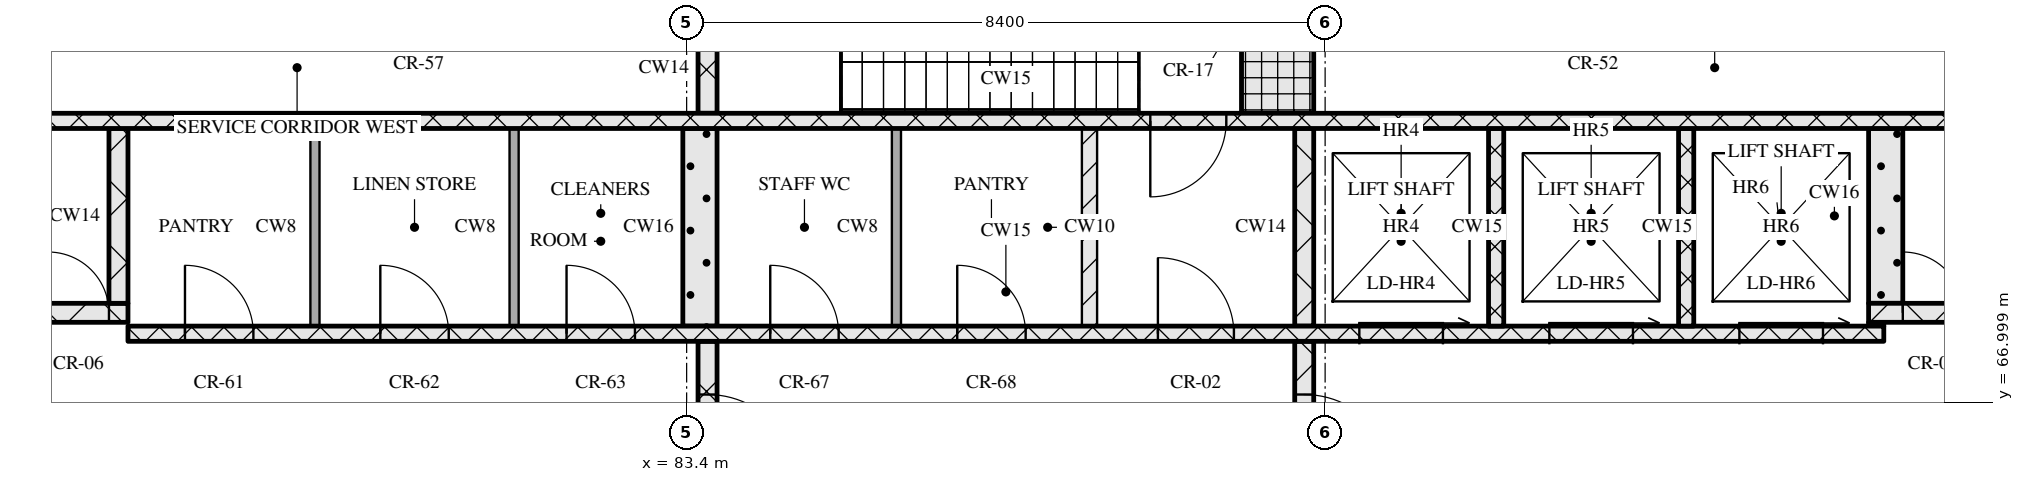
"""IFC4 building model, lengths in metres.
Left out: names, types, materials, properties, quantities, classifications, styles, units other than length and angle.
Written with IfcOpenShell. Run it as: python <this file> out.ifc"""

import sys

from ifc_helpers import new_model, si_unit, direction, frame, frame_2d, origin, place, context, subcontext, project, spatial, rectangle, extrude, element, fill, save


model = new_model("IFC4")
c1 = context("Model", 3, precision=1e-05, world=origin(), true_north=direction((0.0, 1.0)))
c2 = subcontext(c1, "Body", "Model", "MODEL_VIEW")
j1 = project(units=[si_unit("LENGTHUNIT", "METRE"), si_unit("PLANEANGLEUNIT", "RADIAN")], contexts=[c1])
p1 = place(None, origin())
s1 = spatial("IfcSite", under=j1, at=p1, CompositionType="ELEMENT")
p2 = place(p1, origin())
s2 = spatial("IfcBuilding", under=s1, at=p2, CompositionType="ELEMENT")
p3 = place(p2, frame((0.0, 0.0, 194.25)))
s3 = spatial("IfcBuildingStorey", under=s2, at=p3, CompositionType="ELEMENT", Elevation=194.25)
p4 = place(p3, frame((83.675, 65.2, 0.0), z_axis=(0.0, 0.0, 1.0), x_axis=(0.0, 1.0, 0.0)))
e1 = element("IfcWall", 1, at=p4, inside=s3, PredefinedType="SOLIDWALL", context=c2, shape_type="SweptSolid", body=[
    extrude(rectangle(XDim=2.6, YDim=0.25, at=frame_2d((1.3, 0.0))), origin(), (0.0, 0.0, 1.0), 10.97),
])
p5 = place(p4, frame((0.7, 0.0, 0.0)))
e2 = element("IfcOpeningElement", 2, at=p5, cuts=e1, PredefinedType="OPENING", context=c2, shape_type="SweptSolid", body=[
    extrude(rectangle(XDim=1.2, YDim=2.1, at=frame_2d((0.6, 1.05))), frame((0.0, 0.135, 0.0), z_axis=(0.0, -1.0, 0.0), x_axis=(1.0, 0.0, 0.0)), (0.0, 0.0, 1.0), 0.27),
])
p6 = place(p3, frame((91.525, 65.2, 0.0), z_axis=(0.0, 0.0, 1.0), x_axis=(0.0, 1.0, 0.0)))
e3 = element("IfcWall", 3, at=p6, inside=s3, PredefinedType="SOLIDWALL", context=c2, shape_type="SweptSolid", body=[
    extrude(rectangle(XDim=2.6, YDim=0.25, at=frame_2d((1.3, 0.0))), origin(), (0.0, 0.0, 1.0), 10.97),
])
p7 = place(p6, frame((0.7, 0.0, 0.0)))
e4 = element("IfcOpeningElement", 4, at=p7, cuts=e3, PredefinedType="OPENING", context=c2, shape_type="SweptSolid", body=[
    extrude(rectangle(XDim=1.2, YDim=2.1, at=frame_2d((0.6, 1.05))), frame((0.0, 0.135, 0.0), z_axis=(0.0, -1.0, 0.0), x_axis=(1.0, 0.0, 0.0)), (0.0, 0.0, 1.0), 0.27),
])
p8 = place(p3, frame((76.05, 67.9, 0.0), z_axis=(0.0, 0.0, 1.0), x_axis=(1.0, 0.0, 0.0)))
e5 = element("IfcWall", 5, at=p8, inside=s3, PredefinedType="SOLIDWALL", context=c2, shape_type="SweptSolid", body=[
    extrude(rectangle(XDim=23.1, YDim=0.2, at=frame_2d((11.55, 0.0))), origin(), (0.0, 0.0, 1.0), 10.97),
])
p9 = place(p8, frame((0.75, 0.0, 0.0)))
e6 = element("IfcOpeningElement", 6, at=p9, cuts=e5, PredefinedType="OPENING", context=c2, shape_type="SweptSolid", body=[
    extrude(rectangle(XDim=0.9, YDim=2.1, at=frame_2d((0.45, 1.05))), frame((0.0, 0.11, 0.0), z_axis=(0.0, -1.0, 0.0), x_axis=(1.0, 0.0, 0.0)), (0.0, 0.0, 1.0), 0.22),
])
p10 = place(p8, frame((3.32, 0.0, 0.0)))
e7 = element("IfcOpeningElement", 7, at=p10, cuts=e5, PredefinedType="OPENING", context=c2, shape_type="SweptSolid", body=[
    extrude(rectangle(XDim=0.9, YDim=2.1, at=frame_2d((0.45, 1.05))), frame((0.0, 0.11, 0.0), z_axis=(0.0, -1.0, 0.0), x_axis=(1.0, 0.0, 0.0)), (0.0, 0.0, 1.0), 0.22),
])
p11 = place(p8, frame((5.77, 0.0, 0.0)))
e8 = element("IfcOpeningElement", 8, at=p11, cuts=e5, PredefinedType="OPENING", context=c2, shape_type="SweptSolid", body=[
    extrude(rectangle(XDim=0.9, YDim=2.1, at=frame_2d((0.45, 1.05))), frame((0.0, 0.11, 0.0), z_axis=(0.0, -1.0, 0.0), x_axis=(1.0, 0.0, 0.0)), (0.0, 0.0, 1.0), 0.22),
])
p12 = place(p8, frame((8.45, 0.0, 0.0)))
e9 = element("IfcOpeningElement", 9, at=p12, cuts=e5, PredefinedType="OPENING", context=c2, shape_type="SweptSolid", body=[
    extrude(rectangle(XDim=0.9, YDim=2.1, at=frame_2d((0.45, 1.05))), frame((0.0, 0.11, 0.0), z_axis=(0.0, -1.0, 0.0), x_axis=(1.0, 0.0, 0.0)), (0.0, 0.0, 1.0), 0.22),
])
p13 = place(p8, frame((10.91, 0.0, 0.0)))
e10 = element("IfcOpeningElement", 10, at=p13, cuts=e5, PredefinedType="OPENING", context=c2, shape_type="SweptSolid", body=[
    extrude(rectangle(XDim=0.9, YDim=2.1, at=frame_2d((0.45, 1.05))), frame((0.0, 0.11, 0.0), z_axis=(0.0, -1.0, 0.0), x_axis=(1.0, 0.0, 0.0)), (0.0, 0.0, 1.0), 0.22),
])
p14 = place(p8, frame((13.55, 0.0, 0.0)))
e11 = element("IfcOpeningElement", 11, at=p14, cuts=e5, PredefinedType="OPENING", context=c2, shape_type="SweptSolid", body=[
    extrude(rectangle(XDim=1.0, YDim=2.1, at=frame_2d((0.5, 1.05))), frame((0.0, 0.11, 0.0), z_axis=(0.0, -1.0, 0.0), x_axis=(1.0, 0.0, 0.0)), (0.0, 0.0, 1.0), 0.22),
])
p15 = place(p8, frame((16.2, 0.0, 0.0)))
e12 = element("IfcOpeningElement", 12, at=p15, cuts=e5, PredefinedType="OPENING", context=c2, shape_type="SweptSolid", body=[
    extrude(rectangle(XDim=1.1, YDim=2.1, at=frame_2d((0.55, 1.05))), frame((0.0, 0.11, 0.0), z_axis=(0.0, -1.0, 0.0), x_axis=(1.0, 0.0, 0.0)), (0.0, 0.0, 1.0), 0.22),
])
p16 = place(p8, frame((18.7, 0.0, 0.0)))
e13 = element("IfcOpeningElement", 13, at=p16, cuts=e5, PredefinedType="OPENING", context=c2, shape_type="SweptSolid", body=[
    extrude(rectangle(XDim=1.1, YDim=2.1, at=frame_2d((0.55, 1.05))), frame((0.0, 0.11, 0.0), z_axis=(0.0, -1.0, 0.0), x_axis=(1.0, 0.0, 0.0)), (0.0, 0.0, 1.0), 0.22),
])
p17 = place(p8, frame((21.2, 0.0, 0.0)))
e14 = element("IfcOpeningElement", 14, at=p17, cuts=e5, PredefinedType="OPENING", context=c2, shape_type="SweptSolid", body=[
    extrude(rectangle(XDim=1.1, YDim=2.1, at=frame_2d((0.55, 1.05))), frame((0.0, 0.11, 0.0), z_axis=(0.0, -1.0, 0.0), x_axis=(1.0, 0.0, 0.0)), (0.0, 0.0, 1.0), 0.22),
])
for number, where, z_axis, x_axis in (
    (15, (78.51, 68.0, 0.0), (0.0, 0.0, 1.0), (0.0, 1.0, 0.0)),
    (16, (81.13, 68.0, 0.0), (0.0, 0.0, 1.0), (0.0, 1.0, 0.0)),
):
    element("IfcWall", number, at=place(p3, frame(where, z_axis=z_axis, x_axis=x_axis)), inside=s3, PredefinedType="PARTITIONING", context=c2, shape_type="SweptSolid", body=[
        extrude(rectangle(XDim=2.6, YDim=0.12, at=frame_2d((1.3, 0.0))), origin(), (0.0, 0.0, 1.0), 10.97),
    ])
p18 = place(p3, frame((83.575, 68.0, 0.0), z_axis=(0.0, 0.0, 1.0), x_axis=(0.0, 1.0, 0.0)))
e17 = element("IfcWall", 17, at=p18, inside=s3, PredefinedType="SOLIDWALL", context=c2, shape_type="SweptSolid", body=[
    extrude(rectangle(XDim=2.6, YDim=0.45, at=frame_2d((1.3, 0.0))), origin(), (0.0, 0.0, 1.0), 10.97),
])
p19 = place(p3, frame((86.16, 68.0, 0.0), z_axis=(0.0, 0.0, 1.0), x_axis=(0.0, 1.0, 0.0)))
e18 = element("IfcWall", 18, at=p19, inside=s3, PredefinedType="PARTITIONING", context=c2, shape_type="SweptSolid", body=[
    extrude(rectangle(XDim=2.6, YDim=0.12, at=frame_2d((1.3, 0.0))), origin(), (0.0, 0.0, 1.0), 10.97),
])
p20 = place(p3, frame((88.7, 68.0, 0.0), z_axis=(0.0, 0.0, 1.0), x_axis=(0.0, 1.0, 0.0)))
e19 = element("IfcWall", 19, at=p20, inside=s3, PredefinedType="PARTITIONING", context=c2, shape_type="SweptSolid", body=[
    extrude(rectangle(XDim=2.6, YDim=0.2, at=frame_2d((1.3, 0.0))), origin(), (0.0, 0.0, 1.0), 10.97),
])
p21 = place(p3, frame((91.525, 68.0, 0.0), z_axis=(0.0, 0.0, 1.0), x_axis=(0.0, 1.0, 0.0)))
e20 = element("IfcWall", 20, at=p21, inside=s3, PredefinedType="SOLIDWALL", context=c2, shape_type="SweptSolid", body=[
    extrude(rectangle(XDim=2.6, YDim=0.25, at=frame_2d((1.3, 0.0))), origin(), (0.0, 0.0, 1.0), 10.97),
])
for number, where, z_axis, x_axis in (
    (21, (94.05, 68.0, 0.0), (0.0, 0.0, 1.0), (0.0, 1.0, 0.0)),
    (22, (96.55, 68.0, 0.0), (0.0, 0.0, 1.0), (0.0, 1.0, 0.0)),
):
    element("IfcWall", number, at=place(p3, frame(where, z_axis=z_axis, x_axis=x_axis)), inside=s3, PredefinedType="SOLIDWALL", context=c2, shape_type="SweptSolid", body=[
        extrude(rectangle(XDim=2.6, YDim=0.2, at=frame_2d((1.3, 0.0))), origin(), (0.0, 0.0, 1.0), 10.97),
    ])
p22 = place(p3, frame((98.95, 68.025, 0.0), z_axis=(0.0, 0.0, 1.0), x_axis=(1.0, 0.0, 0.0)))
e23 = element("IfcWall", 23, at=p22, inside=s3, PredefinedType="SOLIDWALL", context=c2, shape_type="SweptSolid", body=[
    extrude(rectangle(XDim=0.2, YDim=0.05, at=frame_2d((0.1, 0.0))), origin(), (0.0, 0.0, 1.0), 10.97),
])
p23 = place(p3, frame((67.8, 68.175, 0.0), z_axis=(0.0, 0.0, 1.0), x_axis=(1.0, 0.0, 0.0)))
e24 = element("IfcWall", 24, at=p23, inside=s3, PredefinedType="SOLIDWALL", context=c2, shape_type="SweptSolid", body=[
    extrude(rectangle(XDim=8.25, YDim=0.25, at=frame_2d((4.125, 0.0))), origin(), (0.0, 0.0, 1.0), 10.97),
])
p24 = place(p23, frame((5.7, 0.0, 0.0)))
e25 = element("IfcOpeningElement", 25, at=p24, cuts=e24, PredefinedType="OPENING", context=c2, shape_type="SweptSolid", body=[
    extrude(rectangle(XDim=1.0, YDim=2.1, at=frame_2d((0.5, 1.05))), frame((0.0, 0.135, 0.0), z_axis=(0.0, -1.0, 0.0), x_axis=(1.0, 0.0, 0.0)), (0.0, 0.0, 1.0), 0.27),
])
p25 = place(p23, frame((7.2, 0.0, 0.0)))
e26 = element("IfcOpeningElement", 26, at=p25, cuts=e24, PredefinedType="OPENING", context=c2, shape_type="SweptSolid", body=[
    extrude(rectangle(XDim=0.8, YDim=2.1, at=frame_2d((0.4, 1.05))), frame((0.0, 0.135, 0.0), z_axis=(0.0, -1.0, 0.0), x_axis=(1.0, 0.0, 0.0)), (0.0, 0.0, 1.0), 0.27),
])
p26 = place(p3, frame((98.95, 68.175, 0.0), z_axis=(0.0, 0.0, 1.0), x_axis=(1.0, 0.0, 0.0)))
e27 = element("IfcWall", 27, at=p26, inside=s3, PredefinedType="SOLIDWALL", context=c2, shape_type="SweptSolid", body=[
    extrude(rectangle(XDim=8.45, YDim=0.25, at=frame_2d((4.225, 0.0))), origin(), (0.0, 0.0, 1.0), 10.97),
])
p27 = place(p26, frame((0.45, 0.0, 0.0)))
e28 = element("IfcOpeningElement", 28, at=p27, cuts=e27, PredefinedType="OPENING", context=c2, shape_type="SweptSolid", body=[
    extrude(rectangle(XDim=0.8, YDim=2.1, at=frame_2d((0.4, 1.05))), frame((0.0, 0.135, 0.0), z_axis=(0.0, -1.0, 0.0), x_axis=(1.0, 0.0, 0.0)), (0.0, 0.0, 1.0), 0.27),
])
p28 = place(p26, frame((1.75, 0.0, 0.0)))
e29 = element("IfcOpeningElement", 29, at=p28, cuts=e27, PredefinedType="OPENING", context=c2, shape_type="SweptSolid", body=[
    extrude(rectangle(XDim=1.0, YDim=2.1, at=frame_2d((0.5, 1.05))), frame((0.0, 0.135, 0.0), z_axis=(0.0, -1.0, 0.0), x_axis=(1.0, 0.0, 0.0)), (0.0, 0.0, 1.0), 0.27),
])
p29 = place(p3, frame((75.925, 68.3, 0.0), z_axis=(0.0, 0.0, 1.0), x_axis=(0.0, 1.0, 0.0)))
e30 = element("IfcWall", 30, at=p29, inside=s3, PredefinedType="SOLIDWALL", context=c2, shape_type="SweptSolid", body=[
    extrude(rectangle(XDim=2.3, YDim=0.25, at=frame_2d((1.15, 0.0))), origin(), (0.0, 0.0, 1.0), 10.97),
])
p30 = place(p3, frame((99.175, 68.3, 0.0), z_axis=(0.0, 0.0, 1.0), x_axis=(0.0, 1.0, 0.0)))
e31 = element("IfcWall", 31, at=p30, inside=s3, PredefinedType="SOLIDWALL", context=c2, shape_type="SweptSolid", body=[
    extrude(rectangle(XDim=2.3, YDim=0.45, at=frame_2d((1.15, 0.0))), origin(), (0.0, 0.0, 1.0), 10.97),
])
p31 = place(p3, frame((67.8, 70.7, 0.0), z_axis=(0.0, 0.0, 1.0), x_axis=(1.0, 0.0, 0.0)))
e32 = element("IfcWall", 32, at=p31, inside=s3, PredefinedType="SOLIDWALL", context=c2, shape_type="SweptSolid", body=[
    extrude(rectangle(XDim=39.6, YDim=0.2, at=frame_2d((19.8, 0.0))), origin(), (0.0, 0.0, 1.0), 10.97),
])
p32 = place(p31, frame((0.65, 0.0, 0.0)))
e33 = element("IfcOpeningElement", 33, at=p32, cuts=e32, PredefinedType="OPENING", context=c2, shape_type="SweptSolid", body=[
    extrude(rectangle(XDim=1.1, YDim=2.1, at=frame_2d((0.55, 1.05))), frame((0.0, 0.11, 0.0), z_axis=(0.0, -1.0, 0.0), x_axis=(1.0, 0.0, 0.0)), (0.0, 0.0, 1.0), 0.22),
])
p33 = place(p31, frame((3.25, 0.0, 0.0)))
e34 = element("IfcOpeningElement", 34, at=p33, cuts=e32, PredefinedType="OPENING", context=c2, shape_type="SweptSolid", body=[
    extrude(rectangle(XDim=1.1, YDim=2.1, at=frame_2d((0.55, 1.05))), frame((0.0, 0.11, 0.0), z_axis=(0.0, -1.0, 0.0), x_axis=(1.0, 0.0, 0.0)), (0.0, 0.0, 1.0), 0.22),
])
p34 = place(p31, frame((5.9, 0.0, 0.0)))
e35 = element("IfcOpeningElement", 35, at=p34, cuts=e32, PredefinedType="OPENING", context=c2, shape_type="SweptSolid", body=[
    extrude(rectangle(XDim=1.0, YDim=2.1, at=frame_2d((0.5, 1.05))), frame((0.0, 0.11, 0.0), z_axis=(0.0, -1.0, 0.0), x_axis=(1.0, 0.0, 0.0)), (0.0, 0.0, 1.0), 0.22),
])
p35 = place(p31, frame((21.7, 0.0, 0.0)))
e36 = element("IfcOpeningElement", 36, at=p35, cuts=e32, PredefinedType="OPENING", context=c2, shape_type="SweptSolid", body=[
    extrude(rectangle(XDim=1.0, YDim=2.1, at=frame_2d((0.5, 1.05))), frame((0.0, 0.11, 0.0), z_axis=(0.0, -1.0, 0.0), x_axis=(1.0, 0.0, 0.0)), (0.0, 0.0, 1.0), 0.22),
])
p36 = place(p31, frame((32.7, 0.0, 0.0)))
e37 = element("IfcOpeningElement", 37, at=p36, cuts=e32, PredefinedType="OPENING", context=c2, shape_type="SweptSolid", body=[
    extrude(rectangle(XDim=1.0, YDim=2.1, at=frame_2d((0.5, 1.05))), frame((0.0, 0.11, 0.0), z_axis=(0.0, -1.0, 0.0), x_axis=(1.0, 0.0, 0.0)), (0.0, 0.0, 1.0), 0.22),
])
p37 = place(p31, frame((35.25, 0.0, 0.0)))
e38 = element("IfcOpeningElement", 38, at=p37, cuts=e32, PredefinedType="OPENING", context=c2, shape_type="SweptSolid", body=[
    extrude(rectangle(XDim=1.1, YDim=2.1, at=frame_2d((0.55, 1.05))), frame((0.0, 0.11, 0.0), z_axis=(0.0, -1.0, 0.0), x_axis=(1.0, 0.0, 0.0)), (0.0, 0.0, 1.0), 0.22),
])
p38 = place(p31, frame((37.85, 0.0, 0.0)))
e39 = element("IfcOpeningElement", 39, at=p38, cuts=e32, PredefinedType="OPENING", context=c2, shape_type="SweptSolid", body=[
    extrude(rectangle(XDim=1.1, YDim=2.1, at=frame_2d((0.55, 1.05))), frame((0.0, 0.11, 0.0), z_axis=(0.0, -1.0, 0.0), x_axis=(1.0, 0.0, 0.0)), (0.0, 0.0, 1.0), 0.22),
])
p39 = place(p3, frame((83.675, 70.8, 0.0), z_axis=(0.0, 0.0, 1.0), x_axis=(0.0, 1.0, 0.0)))
e40 = element("IfcWall", 40, at=p39, inside=s3, PredefinedType="SOLIDWALL", context=c2, shape_type="SweptSolid", body=[
    extrude(rectangle(XDim=1.2, YDim=0.25, at=frame_2d((0.6, 0.0))), origin(), (0.0, 0.0, 1.0), 10.97),
])
p40 = place(p3, frame((91.175, 70.8, 0.0), z_axis=(0.0, 0.0, 1.0), x_axis=(0.0, 1.0, 0.0)))
e41 = element("IfcWall", 41, at=p40, inside=s3, PredefinedType="SOLIDWALL", context=c2, shape_type="SweptSolid", body=[
    extrude(rectangle(XDim=1.2, YDim=0.95, at=frame_2d((0.6, 0.0))), origin(), (0.0, 0.0, 1.0), 10.97),
])
p41 = place(p5, origin())
e42 = element("IfcDoor", 42, at=p41, inside=s3, OperationType="SINGLE_SWING_RIGHT", PredefinedType="DOOR", context=c2, shape_type="SweptSolid", body=[
    extrude(rectangle(XDim=1.2, YDim=2.1, at=frame_2d((0.6, 1.05))), frame((0.0, 0.025, 0.0), z_axis=(0.0, -1.0, 0.0), x_axis=(1.0, 0.0, 0.0)), (0.0, 0.0, 1.0), 0.05),
])
fill(e2, e42)
p42 = place(p7, origin())
e43 = element("IfcDoor", 43, at=p42, inside=s3, OperationType="SINGLE_SWING_RIGHT", PredefinedType="DOOR", context=c2, shape_type="SweptSolid", body=[
    extrude(rectangle(XDim=1.2, YDim=2.1, at=frame_2d((0.6, 1.05))), frame((0.0, 0.025, 0.0), z_axis=(0.0, -1.0, 0.0), x_axis=(1.0, 0.0, 0.0)), (0.0, 0.0, 1.0), 0.05),
])
fill(e4, e43)
p43 = place(p9, origin())
e44 = element("IfcDoor", 44, at=p43, inside=s3, OperationType="SINGLE_SWING_LEFT", PredefinedType="DOOR", context=c2, shape_type="SweptSolid", body=[
    extrude(rectangle(XDim=0.9, YDim=2.1, at=frame_2d((0.45, 1.05))), frame((0.0, 0.025, 0.0), z_axis=(0.0, -1.0, 0.0), x_axis=(1.0, 0.0, 0.0)), (0.0, 0.0, 1.0), 0.05),
])
fill(e6, e44)
p44 = place(p10, origin())
e45 = element("IfcDoor", 45, at=p44, inside=s3, OperationType="SINGLE_SWING_LEFT", PredefinedType="DOOR", context=c2, shape_type="SweptSolid", body=[
    extrude(rectangle(XDim=0.9, YDim=2.1, at=frame_2d((0.45, 1.05))), frame((0.0, 0.025, 0.0), z_axis=(0.0, -1.0, 0.0), x_axis=(1.0, 0.0, 0.0)), (0.0, 0.0, 1.0), 0.05),
])
fill(e7, e45)
p45 = place(p11, origin())
e46 = element("IfcDoor", 46, at=p45, inside=s3, OperationType="SINGLE_SWING_LEFT", PredefinedType="DOOR", context=c2, shape_type="SweptSolid", body=[
    extrude(rectangle(XDim=0.9, YDim=2.1, at=frame_2d((0.45, 1.05))), frame((0.0, 0.025, 0.0), z_axis=(0.0, -1.0, 0.0), x_axis=(1.0, 0.0, 0.0)), (0.0, 0.0, 1.0), 0.05),
])
fill(e8, e46)
p46 = place(p12, origin())
e47 = element("IfcDoor", 47, at=p46, inside=s3, OperationType="SINGLE_SWING_LEFT", PredefinedType="DOOR", context=c2, shape_type="SweptSolid", body=[
    extrude(rectangle(XDim=0.9, YDim=2.1, at=frame_2d((0.45, 1.05))), frame((0.0, 0.025, 0.0), z_axis=(0.0, -1.0, 0.0), x_axis=(1.0, 0.0, 0.0)), (0.0, 0.0, 1.0), 0.05),
])
fill(e9, e47)
p47 = place(p13, origin())
e48 = element("IfcDoor", 48, at=p47, inside=s3, OperationType="SINGLE_SWING_LEFT", PredefinedType="DOOR", context=c2, shape_type="SweptSolid", body=[
    extrude(rectangle(XDim=0.9, YDim=2.1, at=frame_2d((0.45, 1.05))), frame((0.0, 0.025, 0.0), z_axis=(0.0, -1.0, 0.0), x_axis=(1.0, 0.0, 0.0)), (0.0, 0.0, 1.0), 0.05),
])
fill(e10, e48)
p48 = place(p14, origin())
e49 = element("IfcDoor", 49, at=p48, inside=s3, OperationType="SINGLE_SWING_LEFT", PredefinedType="DOOR", context=c2, shape_type="SweptSolid", body=[
    extrude(rectangle(XDim=1.0, YDim=2.1, at=frame_2d((0.5, 1.05))), frame((0.0, 0.025, 0.0), z_axis=(0.0, -1.0, 0.0), x_axis=(1.0, 0.0, 0.0)), (0.0, 0.0, 1.0), 0.05),
])
fill(e11, e49)
p49 = place(p15, origin())
e50 = element("IfcDoor", 50, at=p49, inside=s3, OperationType="SLIDING_TO_RIGHT", PredefinedType="DOOR", context=c2, shape_type="SweptSolid", body=[
    extrude(rectangle(XDim=1.1, YDim=2.1, at=frame_2d((0.55, 1.05))), frame((0.0, 0.025, 0.0), z_axis=(0.0, -1.0, 0.0), x_axis=(1.0, 0.0, 0.0)), (0.0, 0.0, 1.0), 0.05),
])
fill(e12, e50)
p50 = place(p16, origin())
e51 = element("IfcDoor", 51, at=p50, inside=s3, OperationType="SLIDING_TO_RIGHT", PredefinedType="DOOR", context=c2, shape_type="SweptSolid", body=[
    extrude(rectangle(XDim=1.1, YDim=2.1, at=frame_2d((0.55, 1.05))), frame((0.0, 0.025, 0.0), z_axis=(0.0, -1.0, 0.0), x_axis=(1.0, 0.0, 0.0)), (0.0, 0.0, 1.0), 0.05),
])
fill(e13, e51)
p51 = place(p17, origin())
e52 = element("IfcDoor", 52, at=p51, inside=s3, OperationType="SLIDING_TO_RIGHT", PredefinedType="DOOR", context=c2, shape_type="SweptSolid", body=[
    extrude(rectangle(XDim=1.1, YDim=2.1, at=frame_2d((0.55, 1.05))), frame((0.0, 0.025, 0.0), z_axis=(0.0, -1.0, 0.0), x_axis=(1.0, 0.0, 0.0)), (0.0, 0.0, 1.0), 0.05),
])
fill(e14, e52)
p52 = place(p25, origin())
e53 = element("IfcDoor", 53, at=p52, inside=s3, OperationType="SINGLE_SWING_LEFT", PredefinedType="DOOR", context=c2, shape_type="SweptSolid", body=[
    extrude(rectangle(XDim=0.8, YDim=2.1, at=frame_2d((0.4, 1.05))), frame((0.0, 0.025, 0.0), z_axis=(0.0, -1.0, 0.0), x_axis=(1.0, 0.0, 0.0)), (0.0, 0.0, 1.0), 0.05),
])
fill(e26, e53)
p53 = place(p27, origin())
e54 = element("IfcDoor", 54, at=p53, inside=s3, OperationType="SINGLE_SWING_LEFT", PredefinedType="DOOR", context=c2, shape_type="SweptSolid", body=[
    extrude(rectangle(XDim=0.8, YDim=2.1, at=frame_2d((0.4, 1.05))), frame((0.0, 0.025, 0.0), z_axis=(0.0, -1.0, 0.0), x_axis=(1.0, 0.0, 0.0)), (0.0, 0.0, 1.0), 0.05),
])
fill(e28, e54)
p54 = place(p35, origin())
e55 = element("IfcDoor", 55, at=p54, inside=s3, OperationType="SINGLE_SWING_RIGHT", PredefinedType="DOOR", context=c2, shape_type="SweptSolid", body=[
    extrude(rectangle(XDim=1.0, YDim=2.1, at=frame_2d((0.5, 1.05))), frame((0.0, 0.025, 0.0), z_axis=(0.0, -1.0, 0.0), x_axis=(1.0, 0.0, 0.0)), (0.0, 0.0, 1.0), 0.05),
])
fill(e36, e55)
save(model, sys.argv[1])
